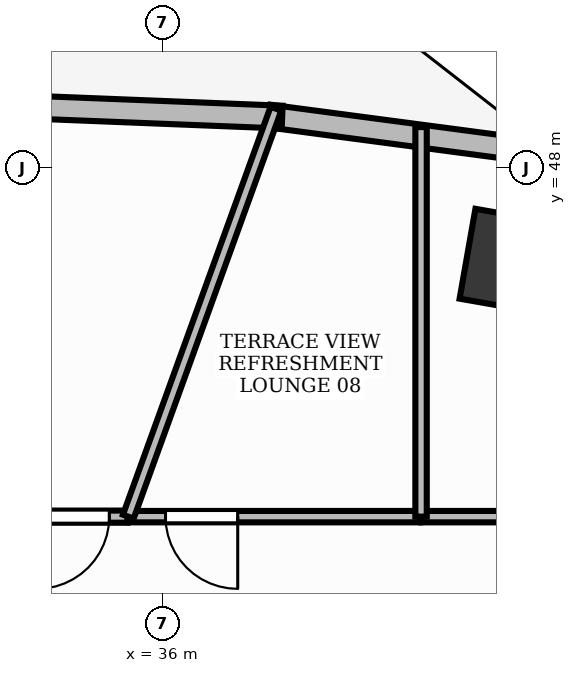
"""IFC4 building model, lengths in metres.
Left out: names, types, materials, properties, quantities, classifications, styles, units other than length and angle.
Written with IfcOpenShell. Run it as: python <this file> out.ifc"""

import sys

from ifc_helpers import new_model, si_unit, direction, frame, frame_2d, origin, origin_2d, place, context, subcontext, project, spatial, rectangle, extrude, element, fill, save


model = new_model("IFC4")
c1 = context("Model", 3, precision=1e-05, world=origin(), true_north=direction((0.0, 1.0)))
c2 = subcontext(c1, "Body", "Model", "MODEL_VIEW")
j1 = project(units=[si_unit("LENGTHUNIT", "METRE"), si_unit("PLANEANGLEUNIT", "RADIAN")], contexts=[c1])
p1 = place(None, origin())
s1 = spatial("IfcSite", under=j1, at=p1, CompositionType="ELEMENT")
p2 = place(p1, origin())
s2 = spatial("IfcBuilding", under=s1, at=p2, CompositionType="ELEMENT")
p3 = place(p2, frame((0.0, 0.0, 127.8)))
s3 = spatial("IfcBuildingStorey", under=s2, at=p3, CompositionType="ELEMENT", Elevation=127.8)
p4 = place(p3, frame((40.604, 46.765, -0.0), z_axis=(0.0, 0.0, 1.0), x_axis=(-0.984868307662, 0.173304404339, 0.0)))
e1 = element("IfcColumn", 1, at=p4, inside=s3, PredefinedType="COLUMN", context=c2, shape_type="SweptSolid", body=[
    extrude(rectangle(XDim=1.2, YDim=1.2, at=origin_2d()), origin(), (0.0, 0.0, 1.0), 3.901),
])
p5 = place(p3, frame((40.987, 48.207, 0.0), z_axis=(0.0, 0.0, 1.0), x_axis=(-0.991372969521, 0.131071107816, 0.0)))
e2 = element("IfcWall", 2, at=p5, inside=s3, PredefinedType="STANDARD", context=c2, shape_type="SweptSolid", body=[
    extrude(rectangle(XDim=3.615, YDim=0.3, at=frame_2d((1.808, 0.0))), origin(), (0.0, 0.0, 1.0), 3.47),
])
p6 = place(p3, frame((37.574, 48.666, 0.0), z_axis=(0.0, 0.0, 1.0), x_axis=(-0.999212076676, 0.039689114679, 0.0)))
e3 = element("IfcWall", 3, at=p6, inside=s3, PredefinedType="STANDARD", context=c2, shape_type="SweptSolid", body=[
    extrude(rectangle(XDim=3.635, YDim=0.3, at=frame_2d((1.818, 0.0))), origin(), (0.0, 0.0, 1.0), 3.9),
])
p7 = place(p3, frame((44.2, 43.41, 0.0), z_axis=(0.0, 0.0, 1.0), x_axis=(-1.0, 0.0, 0.0)))
e4 = element("IfcWall", 4, at=p7, inside=s3, PredefinedType="PARTITIONING", context=c2, shape_type="SweptSolid", body=[
    extrude(rectangle(XDim=4.798, YDim=0.15, at=frame_2d((2.399, 0.0))), origin(), (0.0, 0.0, 1.0), 2.91),
])
p8 = place(p7, frame((0.24, 0.0, 0.0)))
e5 = element("IfcOpeningElement", 5, at=p8, cuts=e4, PredefinedType="OPENING", context=c2, shape_type="SweptSolid", body=[
    extrude(rectangle(XDim=0.95, YDim=2.15, at=frame_2d((0.475, 1.075))), frame((0.0, 0.09, 0.0), z_axis=(0.0, -1.0, 0.0), x_axis=(1.0, 0.0, 0.0)), (0.0, 0.0, 1.0), 0.18),
])
p9 = place(p3, frame((39.392, 43.41, 0.0), z_axis=(0.0, 0.0, 1.0), x_axis=(-1.0, 0.0, 0.0)))
e6 = element("IfcWall", 6, at=p9, inside=s3, PredefinedType="PARTITIONING", context=c2, shape_type="SweptSolid", body=[
    extrude(rectangle(XDim=3.842, YDim=0.15, at=frame_2d((1.921, 0.0))), origin(), (0.0, 0.0, 1.0), 2.91),
])
p10 = place(p9, frame((2.402, 0.0, 0.0)))
e7 = element("IfcOpeningElement", 7, at=p10, cuts=e6, PredefinedType="OPENING", context=c2, shape_type="SweptSolid", body=[
    extrude(rectangle(XDim=0.95, YDim=2.15, at=frame_2d((0.475, 1.075))), frame((0.0, 0.09, 0.0), z_axis=(0.0, -1.0, 0.0), x_axis=(1.0, 0.0, 0.0)), (0.0, 0.0, 1.0), 0.18),
])
p11 = place(p3, frame((35.54, 43.41, 0.0), z_axis=(0.0, 0.0, 1.0), x_axis=(-1.0, 0.0, 0.0)))
e8 = element("IfcWall", 8, at=p11, inside=s3, PredefinedType="PARTITIONING", context=c2, shape_type="SweptSolid", body=[
    extrude(rectangle(XDim=15.498, YDim=0.16, at=frame_2d((7.749, 0.0))), origin(), (0.0, 0.0, 1.0), 2.91),
])
p12 = place(p11, frame((0.24, 0.0, 0.0)))
e9 = element("IfcOpeningElement", 9, at=p12, cuts=e8, PredefinedType="OPENING", context=c2, shape_type="SweptSolid", body=[
    extrude(rectangle(XDim=0.95, YDim=2.15, at=frame_2d((0.475, 1.075))), frame((0.0, 0.095, 0.0), z_axis=(0.0, -1.0, 0.0), x_axis=(1.0, 0.0, 0.0)), (0.0, 0.0, 1.0), 0.19),
])
p13 = place(p3, frame((39.402, 43.41, 0.0), z_axis=(0.0, 0.0, 1.0), x_axis=(0.0, 1.0, 0.0)))
e10 = element("IfcWall", 10, at=p13, inside=s3, PredefinedType="PARTITIONING", context=c2, shape_type="SweptSolid", body=[
    extrude(rectangle(XDim=5.125, YDim=0.15, at=frame_2d((2.563, 0.0))), origin(), (0.0, 0.0, 1.0), 2.91),
])
p14 = place(p3, frame((35.55, 43.41, 0.0), z_axis=(0.0, 0.0, 1.0), x_axis=(0.340351757169, 0.940298187487, 0.0)))
e11 = element("IfcWall", 11, at=p14, inside=s3, PredefinedType="PARTITIONING", context=c2, shape_type="SweptSolid", body=[
    extrude(rectangle(XDim=5.708, YDim=0.15, at=frame_2d((2.854, 0.0))), origin(), (0.0, 0.0, 1.0), 2.91),
])
p15 = place(p10, origin())
e12 = element("IfcDoor", 12, at=p15, inside=s3, OperationType="SINGLE_SWING_LEFT", PredefinedType="DOOR", context=c2, shape_type="SweptSolid", body=[
    extrude(rectangle(XDim=0.95, YDim=2.15, at=frame_2d((0.475, 1.075))), frame((0.0, 0.025, 0.0), z_axis=(0.0, -1.0, 0.0), x_axis=(1.0, 0.0, 0.0)), (0.0, 0.0, 1.0), 0.05),
])
fill(e7, e12)
p16 = place(p12, origin())
e13 = element("IfcDoor", 13, at=p16, inside=s3, OperationType="SINGLE_SWING_RIGHT", PredefinedType="DOOR", context=c2, shape_type="SweptSolid", body=[
    extrude(rectangle(XDim=0.95, YDim=2.15, at=frame_2d((0.475, 1.075))), frame((0.0, 0.025, 0.0), z_axis=(0.0, -1.0, 0.0), x_axis=(1.0, 0.0, 0.0)), (0.0, 0.0, 1.0), 0.05),
])
fill(e9, e13)
save(model, sys.argv[1])
